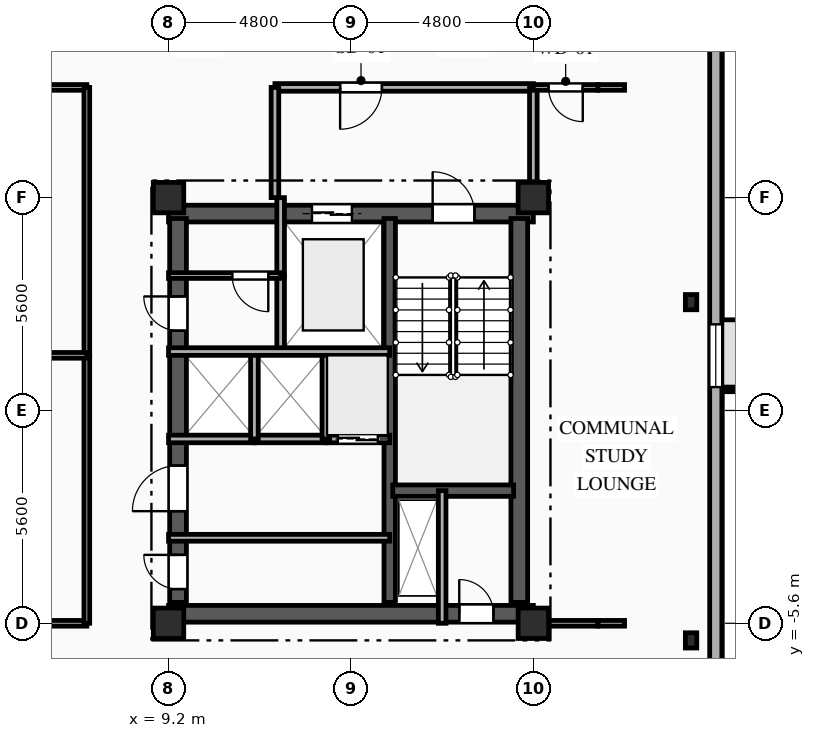
"""IFC4 building model, lengths in metres.
Left out: names, types, materials, properties, quantities, classifications, styles, units other than length and angle.
Written with IfcOpenShell. Run it as: python <this file> out.ifc"""

import sys

from ifc_helpers import new_model, si_unit, direction, frame, frame_2d, origin, origin_2d, place, context, subcontext, project, spatial, rectangle, i_section, extrude, element, fill, save


model = new_model("IFC4")
c1 = context("Model", 3, precision=1e-05, world=origin(), true_north=direction((0.0, 1.0)))
c2 = subcontext(c1, "Body", "Model", "MODEL_VIEW")
j1 = project(units=[si_unit("LENGTHUNIT", "METRE"), si_unit("PLANEANGLEUNIT", "RADIAN")], contexts=[c1])
p1 = place(None, origin())
s1 = spatial("IfcSite", under=j1, at=p1, CompositionType="ELEMENT")
p2 = place(p1, origin())
s2 = spatial("IfcBuilding", under=s1, at=p2, CompositionType="ELEMENT")
p3 = place(p2, frame((0.0, 0.0, 255.1)))
s3 = spatial("IfcBuildingStorey", under=s2, at=p3, CompositionType="ELEMENT", Elevation=255.1)
for number, where, z_axis, x_axis in (
    (1, (9.2, -5.6, 0.0), (0.0, 0.0, 1.0), (1.0, 0.0, 0.0)),
    (2, (9.2, 5.6, 0.0), (0.0, 0.0, 1.0), (1.0, 0.0, 0.0)),
    (3, (18.8, -5.6, 0.0), (0.0, 0.0, 1.0), (1.0, 0.0, 0.0)),
    (4, (18.8, 5.6, 0.0), (0.0, 0.0, 1.0), (1.0, 0.0, 0.0)),
):
    element("IfcColumn", number, at=place(p3, frame(where, z_axis=z_axis, x_axis=x_axis)), inside=s3, PredefinedType="COLUMN", context=c2, shape_type="SweptSolid", body=[
        extrude(rectangle(XDim=0.8, YDim=0.8, at=origin_2d()), origin(), (0.0, 0.0, 1.0), 3.35),
    ])
for number, where, z_axis, x_axis in (
    (5, (22.95, -6.05, 0.0), (0.0, 0.0, 1.0), (1.0, 0.0, 0.0)),
    (6, (22.95, 2.85, 0.0), (0.0, 0.0, 1.0), (1.0, 0.0, 0.0)),
):
    element("IfcColumn", number, at=place(p3, frame(where, z_axis=z_axis, x_axis=x_axis)), inside=s3, PredefinedType="COLUMN", context=c2, shape_type="SweptSolid", body=[
        extrude(i_section(OverallWidth=0.3, OverallDepth=0.4, WebThickness=0.013, FlangeThickness=0.024, FilletRadius=0.027, at=origin_2d()), origin(), (0.0, 0.0, 1.0), 3.35),
    ])
p4 = place(p3, frame((23.6, 12.4, 0.0), z_axis=(0.0, 0.0, 1.0), x_axis=(0.0, -1.0, 0.0)))
e7 = element("IfcWall", 7, at=p4, inside=s3, PredefinedType="SOLIDWALL", context=c2, shape_type="SweptSolid", body=[
    extrude(rectangle(XDim=28.0, YDim=0.32, at=frame_2d((14.0, 0.0))), origin(), (0.0, 0.0, 1.0), 3.04),
])
p5 = place(p4, frame((10.135, 0.0, 0.85)))
e8 = element("IfcOpeningElement", 8, at=p5, cuts=e7, PredefinedType="OPENING", context=c2, shape_type="SweptSolid", body=[
    extrude(rectangle(XDim=1.65, YDim=1.85, at=frame_2d((0.825, 0.925))), frame((0.0, 0.17, 0.0), z_axis=(0.0, -1.0, 0.0), x_axis=(1.0, 0.0, 0.0)), (0.0, 0.0, 1.0), 0.34),
])
p6 = place(p3, frame((9.2, 5.18, 0.0), z_axis=(0.0, 0.0, 1.0), x_axis=(1.0, 0.0, 0.0)))
e9 = element("IfcWall", 9, at=p6, inside=s3, PredefinedType="SHEAR", context=c2, shape_type="SweptSolid", body=[
    extrude(rectangle(XDim=9.6, YDim=0.44, at=frame_2d((4.8, 0.0))), origin(), (0.0, 0.0, 1.0), 3.04),
])
p7 = place(p6, frame((6.95, 0.0, 0.0)))
e10 = element("IfcOpeningElement", 10, at=p7, cuts=e9, PredefinedType="OPENING", context=c2, shape_type="SweptSolid", body=[
    extrude(rectangle(XDim=1.1, YDim=2.15, at=frame_2d((0.55, 1.075))), frame((0.0, 0.23, 0.0), z_axis=(0.0, -1.0, 0.0), x_axis=(1.0, 0.0, 0.0)), (0.0, 0.0, 1.0), 0.46),
])
p8 = place(p6, frame((3.775, 0.0, 0.0)))
e11 = element("IfcOpeningElement", 11, at=p8, cuts=e9, PredefinedType="OPENING", context=c2, shape_type="SweptSolid", body=[
    extrude(rectangle(XDim=1.05, YDim=2.1, at=frame_2d((0.525, 1.05))), frame((0.0, 0.23, 0.0), z_axis=(0.0, -1.0, 0.0), x_axis=(1.0, 0.0, 0.0)), (0.0, 0.0, 1.0), 0.46),
])
p9 = place(p3, frame((9.2, -5.35, 0.0), z_axis=(0.0, 0.0, 1.0), x_axis=(1.0, 0.0, 0.0)))
e12 = element("IfcWall", 12, at=p9, inside=s3, PredefinedType="SHEAR", context=c2, shape_type="SweptSolid", body=[
    extrude(rectangle(XDim=9.6, YDim=0.44, at=frame_2d((4.8, 0.0))), origin(), (0.0, 0.0, 1.0), 3.04),
])
p10 = place(p9, frame((7.65, 0.0, 0.0)))
e13 = element("IfcOpeningElement", 13, at=p10, cuts=e12, PredefinedType="OPENING", context=c2, shape_type="SweptSolid", body=[
    extrude(rectangle(XDim=0.9, YDim=2.1, at=frame_2d((0.45, 1.05))), frame((0.0, 0.23, 0.0), z_axis=(0.0, -1.0, 0.0), x_axis=(1.0, 0.0, 0.0)), (0.0, 0.0, 1.0), 0.46),
])
p11 = place(p3, frame((9.45, -5.05, 0.0), z_axis=(0.0, 0.0, 1.0), x_axis=(0.0, 1.0, 0.0)))
e14 = element("IfcWall", 14, at=p11, inside=s3, PredefinedType="SHEAR", context=c2, shape_type="SweptSolid", body=[
    extrude(rectangle(XDim=10.1, YDim=0.44, at=frame_2d((5.05, 0.0))), origin(), (0.0, 0.0, 1.0), 3.04),
])
p12 = place(p11, frame((7.15, 0.0, 0.0)))
e15 = element("IfcOpeningElement", 15, at=p12, cuts=e14, PredefinedType="OPENING", context=c2, shape_type="SweptSolid", body=[
    extrude(rectangle(XDim=0.9, YDim=2.1, at=frame_2d((0.45, 1.05))), frame((0.0, 0.23, 0.0), z_axis=(0.0, -1.0, 0.0), x_axis=(1.0, 0.0, 0.0)), (0.0, 0.0, 1.0), 0.46),
])
p13 = place(p11, frame((2.4, 0.0, 0.0)))
e16 = element("IfcOpeningElement", 16, at=p13, cuts=e14, PredefinedType="OPENING", context=c2, shape_type="SweptSolid", body=[
    extrude(rectangle(XDim=1.2, YDim=2.15, at=frame_2d((0.6, 1.075))), frame((0.0, 0.23, 0.0), z_axis=(0.0, -1.0, 0.0), x_axis=(1.0, 0.0, 0.0)), (0.0, 0.0, 1.0), 0.46),
])
p14 = place(p11, frame((0.35, 0.0, 0.0)))
e17 = element("IfcOpeningElement", 17, at=p14, cuts=e14, PredefinedType="OPENING", context=c2, shape_type="SweptSolid", body=[
    extrude(rectangle(XDim=0.9, YDim=2.1, at=frame_2d((0.45, 1.05))), frame((0.0, 0.23, 0.0), z_axis=(0.0, -1.0, 0.0), x_axis=(1.0, 0.0, 0.0)), (0.0, 0.0, 1.0), 0.46),
])
p15 = place(p3, frame((18.43, -5.05, 0.0), z_axis=(0.0, 0.0, 1.0), x_axis=(0.0, 1.0, 0.0)))
e18 = element("IfcWall", 18, at=p15, inside=s3, PredefinedType="SHEAR", context=c2, shape_type="SweptSolid", body=[
    extrude(rectangle(XDim=10.1, YDim=0.44, at=frame_2d((5.05, 0.0))), origin(), (0.0, 0.0, 1.0), 3.04),
])
p16 = place(p3, frame((15.02, -5.05, 0.0), z_axis=(0.0, 0.0, 1.0), x_axis=(0.0, 1.0, 0.0)))
e19 = element("IfcWall", 19, at=p16, inside=s3, PredefinedType="SHEAR", context=c2, shape_type="SweptSolid", body=[
    extrude(rectangle(XDim=10.1, YDim=0.3, at=frame_2d((5.05, 0.0))), origin(), (0.0, 0.0, 1.0), 3.04),
])
p17 = place(p3, frame((15.1, -2.11, 0.0), z_axis=(0.0, 0.0, 1.0), x_axis=(1.0, 0.0, 0.0)))
e20 = element("IfcWall", 20, at=p17, inside=s3, PredefinedType="SHEAR", context=c2, shape_type="SweptSolid", body=[
    extrude(rectangle(XDim=3.18, YDim=0.3, at=frame_2d((1.59, 0.0))), origin(), (0.0, 0.0, 1.0), 3.04),
])
p18 = place(p3, frame((16.4, -2.11, 0.0), z_axis=(0.0, 0.0, 1.0), x_axis=(0.0, -1.0, 0.0)))
e21 = element("IfcWall", 21, at=p18, inside=s3, PredefinedType="PARTITIONING", context=c2, shape_type="SweptSolid", body=[
    extrude(rectangle(XDim=3.49, YDim=0.2, at=frame_2d((1.745, 0.0))), origin(), (0.0, 0.0, 1.0), 3.04),
])
p19 = place(p3, frame((12.15, 3.55, 0.0), z_axis=(0.0, 0.0, 1.0), x_axis=(0.0, -1.0, 0.0)))
e22 = element("IfcWall", 22, at=p19, inside=s3, PredefinedType="PARTITIONING", context=c2, shape_type="SweptSolid", body=[
    extrude(rectangle(XDim=2.0, YDim=0.2, at=frame_2d((1.0, 0.0))), origin(), (0.0, 0.0, 1.0), 3.04),
])
p20 = place(p3, frame((12.15, 5.6, 0.0), z_axis=(0.0, 0.0, 1.0), x_axis=(0.0, -1.0, 0.0)))
e23 = element("IfcWall", 23, at=p20, inside=s3, PredefinedType="PARTITIONING", context=c2, shape_type="SweptSolid", body=[
    extrude(rectangle(XDim=2.05, YDim=0.2, at=frame_2d((1.025, 0.0))), origin(), (0.0, 0.0, 1.0), 3.04),
])
p21 = place(p3, frame((18.8, 8.5, 0.0), z_axis=(0.0, 0.0, 1.0), x_axis=(-1.0, 0.0, 0.0)))
e24 = element("IfcWall", 24, at=p21, inside=s3, PredefinedType="PARTITIONING", context=c2, shape_type="SweptSolid", body=[
    extrude(rectangle(XDim=6.8, YDim=0.2, at=frame_2d((3.4, 0.0))), origin(), (0.0, 0.0, 1.0), 3.04),
])
p22 = place(p21, frame((3.985, 0.0, 0.0)))
e25 = element("IfcOpeningElement", 25, at=p22, cuts=e24, PredefinedType="OPENING", context=c2, shape_type="SweptSolid", body=[
    extrude(rectangle(XDim=1.1, YDim=2.15, at=frame_2d((0.55, 1.075))), frame((0.0, 0.11, 0.0), z_axis=(0.0, -1.0, 0.0), x_axis=(1.0, 0.0, 0.0)), (0.0, 0.0, 1.0), 0.22),
])
p23 = place(p3, frame((12.0, 8.5, 0.0), z_axis=(0.0, 0.0, 1.0), x_axis=(0.0, -1.0, 0.0)))
e26 = element("IfcWall", 26, at=p23, inside=s3, PredefinedType="PARTITIONING", context=c2, shape_type="SweptSolid", body=[
    extrude(rectangle(XDim=2.9, YDim=0.2, at=frame_2d((1.45, 0.0))), origin(), (0.0, 0.0, 1.0), 3.04),
])
p24 = place(p3, frame((18.8, 5.6, 0.0), z_axis=(0.0, 0.0, 1.0), x_axis=(0.0, 1.0, 0.0)))
e27 = element("IfcWall", 27, at=p24, inside=s3, PredefinedType="PARTITIONING", context=c2, shape_type="SweptSolid", body=[
    extrude(rectangle(XDim=2.9, YDim=0.2, at=frame_2d((1.45, 0.0))), origin(), (0.0, 0.0, 1.0), 2.665),
])
p25 = place(p3, frame((12.15, 3.55, 0.0), z_axis=(0.0, 0.0, 1.0), x_axis=(-1.0, 0.0, 0.0)))
e28 = element("IfcWall", 28, at=p25, inside=s3, PredefinedType="PARTITIONING", context=c2, shape_type="SweptSolid", body=[
    extrude(rectangle(XDim=2.95, YDim=0.15, at=frame_2d((1.475, 0.0))), origin(), (0.0, 0.0, 1.0), 3.04),
])
p26 = place(p25, frame((0.325, 0.0, 0.0)))
e29 = element("IfcOpeningElement", 29, at=p26, cuts=e28, PredefinedType="OPENING", context=c2, shape_type="SweptSolid", body=[
    extrude(rectangle(XDim=0.95, YDim=2.1, at=frame_2d((0.475, 1.05))), frame((0.0, 0.085, 0.0), z_axis=(0.0, -1.0, 0.0), x_axis=(1.0, 0.0, 0.0)), (0.0, 0.0, 1.0), 0.17),
])
p27 = place(p3, frame((9.2, -3.35, 0.0), z_axis=(0.0, 0.0, 1.0), x_axis=(1.0, 0.0, 0.0)))
e30 = element("IfcWall", 30, at=p27, inside=s3, PredefinedType="PARTITIONING", context=c2, shape_type="SweptSolid", body=[
    extrude(rectangle(XDim=5.82, YDim=0.18, at=frame_2d((2.91, 0.0))), origin(), (0.0, 0.0, 1.0), 2.755),
])
p28 = place(p3, frame((11.46, -0.75, 0.0), z_axis=(0.0, 0.0, 1.0), x_axis=(-1.0, 0.0, 0.0)))
e31 = element("IfcWall", 31, at=p28, inside=s3, PredefinedType="PARTITIONING", context=c2, shape_type="SweptSolid", body=[
    extrude(rectangle(XDim=2.26, YDim=0.2, at=frame_2d((1.13, 0.0))), origin(), (0.0, 0.0, 1.0), 3.04),
])
p29 = place(p3, frame((13.34, -0.75, 0.0), z_axis=(0.0, 0.0, 1.0), x_axis=(-1.0, 0.0, 0.0)))
e32 = element("IfcWall", 32, at=p29, inside=s3, PredefinedType="PARTITIONING", context=c2, shape_type="SweptSolid", body=[
    extrude(rectangle(XDim=1.88, YDim=0.2, at=frame_2d((0.94, 0.0))), origin(), (0.0, 0.0, 1.0), 3.04),
])
p30 = place(p3, frame((15.02, -0.75, 0.0), z_axis=(0.0, 0.0, 1.0), x_axis=(-1.0, 0.0, 0.0)))
e33 = element("IfcWall", 33, at=p30, inside=s3, PredefinedType="PARTITIONING", context=c2, shape_type="SweptSolid", body=[
    extrude(rectangle(XDim=1.68, YDim=0.2, at=frame_2d((0.84, 0.0))), origin(), (0.0, 0.0, 1.0), 3.04),
])
p31 = place(p30, frame((0.315, 0.0, 0.0)))
e34 = element("IfcOpeningElement", 34, at=p31, cuts=e33, PredefinedType="OPENING", context=c2, shape_type="SweptSolid", body=[
    extrude(rectangle(XDim=1.05, YDim=2.1, at=frame_2d((0.525, 1.05))), frame((0.0, 0.11, 0.0), z_axis=(0.0, -1.0, 0.0), x_axis=(1.0, 0.0, 0.0)), (0.0, 0.0, 1.0), 0.22),
])
for number, where, z_axis, x_axis in (
    (35, (11.46, -0.75, 0.0), (0.0, 0.0, 1.0), (0.0, 1.0, 0.0)),
    (36, (13.34, -0.75, 0.0), (0.0, 0.0, 1.0), (0.0, 1.0, 0.0)),
):
    element("IfcWall", number, at=place(p3, frame(where, z_axis=z_axis, x_axis=x_axis)), inside=s3, PredefinedType="PARTITIONING", context=c2, shape_type="SweptSolid", body=[
        extrude(rectangle(XDim=2.3, YDim=0.2, at=frame_2d((1.15, 0.0))), origin(), (0.0, 0.0, 1.0), 3.04),
    ])
p32 = place(p3, frame((20.5, 8.5, 0.0), z_axis=(0.0, 0.0, 1.0), x_axis=(-1.0, 0.0, 0.0)))
e37 = element("IfcWall", 37, at=p32, inside=s3, PredefinedType="PARTITIONING", context=c2, shape_type="SweptSolid", body=[
    extrude(rectangle(XDim=1.7, YDim=0.15, at=frame_2d((0.85, 0.0))), origin(), (0.0, 0.0, 1.0), 3.04),
])
p33 = place(p32, frame((0.4, 0.0, 0.0)))
e38 = element("IfcOpeningElement", 38, at=p33, cuts=e37, PredefinedType="OPENING", context=c2, shape_type="SweptSolid", body=[
    extrude(rectangle(XDim=0.9, YDim=2.1, at=frame_2d((0.45, 1.05))), frame((0.0, 0.085, 0.0), z_axis=(0.0, -1.0, 0.0), x_axis=(1.0, 0.0, 0.0)), (0.0, 0.0, 1.0), 0.17),
])
p34 = place(p3, frame((21.2, 8.5, 0.0), z_axis=(0.0, 0.0, 1.0), x_axis=(-1.0, 0.0, 0.0)))
e39 = element("IfcWall", 39, at=p34, inside=s3, PredefinedType="PARTITIONING", context=c2, shape_type="SweptSolid", body=[
    extrude(rectangle(XDim=0.7, YDim=0.15, at=frame_2d((0.35, 0.0))), origin(), (0.0, 0.0, 1.0), 3.04),
])
p35 = place(p3, frame((7.05, 8.5, 0.0), z_axis=(0.0, 0.0, 1.0), x_axis=(-1.0, 0.0, 0.0)))
e40 = element("IfcWall", 40, at=p35, inside=s3, PredefinedType="PARTITIONING", context=c2, shape_type="SweptSolid", body=[
    extrude(rectangle(XDim=7.05, YDim=0.15, at=frame_2d((3.525, 0.0))), origin(), (0.0, 0.0, 1.0), 3.04),
])
p36 = place(p3, frame((18.8, -5.6, 0.0), z_axis=(0.0, 0.0, 1.0), x_axis=(1.0, 0.0, 0.0)))
e41 = element("IfcWall", 41, at=p36, inside=s3, PredefinedType="PARTITIONING", context=c2, shape_type="SweptSolid", body=[
    extrude(rectangle(XDim=1.7, YDim=0.15, at=frame_2d((0.85, 0.0))), origin(), (0.0, 0.0, 1.0), 3.04),
])
p37 = place(p3, frame((20.5, -5.6, 0.0), z_axis=(0.0, 0.0, 1.0), x_axis=(1.0, 0.0, 0.0)))
e42 = element("IfcWall", 42, at=p37, inside=s3, PredefinedType="PARTITIONING", context=c2, shape_type="SweptSolid", body=[
    extrude(rectangle(XDim=0.7, YDim=0.15, at=frame_2d((0.35, 0.0))), origin(), (0.0, 0.0, 1.0), 3.04),
])
p38 = place(p3, frame((0.0, -5.6, 0.0), z_axis=(0.0, 0.0, 1.0), x_axis=(1.0, 0.0, 0.0)))
e43 = element("IfcWall", 43, at=p38, inside=s3, PredefinedType="PARTITIONING", context=c2, shape_type="SweptSolid", body=[
    extrude(rectangle(XDim=7.05, YDim=0.15, at=frame_2d((3.525, 0.0))), origin(), (0.0, 0.0, 1.0), 2.525),
])
for number, where, z_axis, x_axis in (
    (44, (7.05, -5.6, 0.0), (0.0, 0.0, 1.0), (0.0, 1.0, 0.0)),
    (45, (7.05, 1.45, 0.0), (0.0, 0.0, 1.0), (0.0, 1.0, 0.0)),
):
    element("IfcWall", number, at=place(p3, frame(where, z_axis=z_axis, x_axis=x_axis)), inside=s3, PredefinedType="PARTITIONING", context=c2, shape_type="SweptSolid", body=[
        extrude(rectangle(XDim=7.05, YDim=0.15, at=frame_2d((3.525, 0.0))), origin(), (0.0, 0.0, 1.0), 3.04),
    ])
p39 = place(p3, frame((-7.05, 1.45, 0.0), z_axis=(0.0, 0.0, 1.0), x_axis=(1.0, 0.0, 0.0)))
e46 = element("IfcWall", 46, at=p39, inside=s3, PredefinedType="PARTITIONING", context=c2, shape_type="SweptSolid", body=[
    extrude(rectangle(XDim=14.1, YDim=0.15, at=frame_2d((7.05, 0.0))), origin(), (0.0, 0.0, 1.0), 3.04),
])
p40 = place(p3, frame((9.2, 1.55, 0.0), z_axis=(0.0, 0.0, 1.0), x_axis=(1.0, 0.0, 0.0)))
e47 = element("IfcWall", 47, at=p40, inside=s3, PredefinedType="PARTITIONING", context=c2, shape_type="SweptSolid", body=[
    extrude(rectangle(XDim=5.82, YDim=0.2, at=frame_2d((2.91, 0.0))), origin(), (0.0, 0.0, 1.0), 3.04),
])
p41 = place(p5, origin())
e48 = element("IfcWindow", 48, at=p41, inside=s3, PartitioningType="SINGLE_PANEL", PredefinedType="WINDOW", context=c2, shape_type="SweptSolid", body=[
    extrude(rectangle(XDim=1.65, YDim=1.85, at=frame_2d((0.825, 0.925))), frame((0.0, 0.03, 0.0), z_axis=(0.0, -1.0, 0.0), x_axis=(1.0, 0.0, 0.0)), (0.0, 0.0, 1.0), 0.06),
])
fill(e8, e48)
p42 = place(p7, origin())
e49 = element("IfcDoor", 49, at=p42, inside=s3, OperationType="SINGLE_SWING_LEFT", PredefinedType="DOOR", context=c2, shape_type="SweptSolid", body=[
    extrude(rectangle(XDim=1.1, YDim=2.15, at=frame_2d((0.55, 1.075))), frame((0.0, 0.025, 0.0), z_axis=(0.0, -1.0, 0.0), x_axis=(1.0, 0.0, 0.0)), (0.0, 0.0, 1.0), 0.05),
])
fill(e10, e49)
p43 = place(p8, origin())
e50 = element("IfcDoor", 50, at=p43, inside=s3, OperationType="DOUBLE_DOOR_SLIDING", PredefinedType="DOOR", context=c2, shape_type="SweptSolid", body=[
    extrude(rectangle(XDim=1.05, YDim=2.1, at=frame_2d((0.525, 1.05))), frame((0.0, 0.025, 0.0), z_axis=(0.0, -1.0, 0.0), x_axis=(1.0, 0.0, 0.0)), (0.0, 0.0, 1.0), 0.05),
])
fill(e11, e50)
p44 = place(p10, origin())
e51 = element("IfcDoor", 51, at=p44, inside=s3, OperationType="SINGLE_SWING_LEFT", PredefinedType="DOOR", context=c2, shape_type="SweptSolid", body=[
    extrude(rectangle(XDim=0.9, YDim=2.1, at=frame_2d((0.45, 1.05))), frame((0.0, 0.025, 0.0), z_axis=(0.0, -1.0, 0.0), x_axis=(1.0, 0.0, 0.0)), (0.0, 0.0, 1.0), 0.05),
])
fill(e13, e51)
p45 = place(p22, origin())
e52 = element("IfcDoor", 52, at=p45, inside=s3, OperationType="SINGLE_SWING_RIGHT", PredefinedType="DOOR", context=c2, shape_type="SweptSolid", body=[
    extrude(rectangle(XDim=1.1, YDim=2.15, at=frame_2d((0.55, 1.075))), frame((0.0, 0.025, 0.0), z_axis=(0.0, -1.0, 0.0), x_axis=(1.0, 0.0, 0.0)), (0.0, 0.0, 1.0), 0.05),
])
fill(e25, e52)
p46 = place(p26, origin())
e53 = element("IfcDoor", 53, at=p46, inside=s3, OperationType="SINGLE_SWING_LEFT", PredefinedType="DOOR", context=c2, shape_type="SweptSolid", body=[
    extrude(rectangle(XDim=0.95, YDim=2.1, at=frame_2d((0.475, 1.05))), frame((0.0, 0.025, 0.0), z_axis=(0.0, -1.0, 0.0), x_axis=(1.0, 0.0, 0.0)), (0.0, 0.0, 1.0), 0.05),
])
fill(e29, e53)
p47 = place(p12, origin())
e54 = element("IfcDoor", 54, at=p47, inside=s3, OperationType="SINGLE_SWING_RIGHT", PredefinedType="DOOR", context=c2, shape_type="SweptSolid", body=[
    extrude(rectangle(XDim=0.9, YDim=2.1, at=frame_2d((0.45, 1.05))), frame((0.0, 0.025, 0.0), z_axis=(0.0, -1.0, 0.0), x_axis=(1.0, 0.0, 0.0)), (0.0, 0.0, 1.0), 0.05),
])
fill(e15, e54)
p48 = place(p31, origin())
e55 = element("IfcDoor", 55, at=p48, inside=s3, OperationType="DOUBLE_DOOR_SLIDING", PredefinedType="DOOR", context=c2, shape_type="SweptSolid", body=[
    extrude(rectangle(XDim=1.05, YDim=2.1, at=frame_2d((0.525, 1.05))), frame((0.0, 0.025, 0.0), z_axis=(0.0, -1.0, 0.0), x_axis=(1.0, 0.0, 0.0)), (0.0, 0.0, 1.0), 0.05),
])
fill(e34, e55)
p49 = place(p13, origin())
e56 = element("IfcDoor", 56, at=p49, inside=s3, OperationType="SINGLE_SWING_LEFT", PredefinedType="DOOR", context=c2, shape_type="SweptSolid", body=[
    extrude(rectangle(XDim=1.2, YDim=2.15, at=frame_2d((0.6, 1.075))), frame((0.0, 0.025, 0.0), z_axis=(0.0, -1.0, 0.0), x_axis=(1.0, 0.0, 0.0)), (0.0, 0.0, 1.0), 0.05),
])
fill(e16, e56)
p50 = place(p14, origin())
e57 = element("IfcDoor", 57, at=p50, inside=s3, OperationType="SINGLE_SWING_RIGHT", PredefinedType="DOOR", context=c2, shape_type="SweptSolid", body=[
    extrude(rectangle(XDim=0.9, YDim=2.1, at=frame_2d((0.45, 1.05))), frame((0.0, 0.025, 0.0), z_axis=(0.0, -1.0, 0.0), x_axis=(1.0, 0.0, 0.0)), (0.0, 0.0, 1.0), 0.05),
])
fill(e17, e57)
p51 = place(p33, origin())
e58 = element("IfcDoor", 58, at=p51, inside=s3, OperationType="SINGLE_SWING_LEFT", PredefinedType="DOOR", context=c2, shape_type="SweptSolid", body=[
    extrude(rectangle(XDim=0.9, YDim=2.1, at=frame_2d((0.45, 1.05))), frame((0.0, 0.025, 0.0), z_axis=(0.0, -1.0, 0.0), x_axis=(1.0, 0.0, 0.0)), (0.0, 0.0, 1.0), 0.05),
])
fill(e38, e58)
save(model, sys.argv[1])
